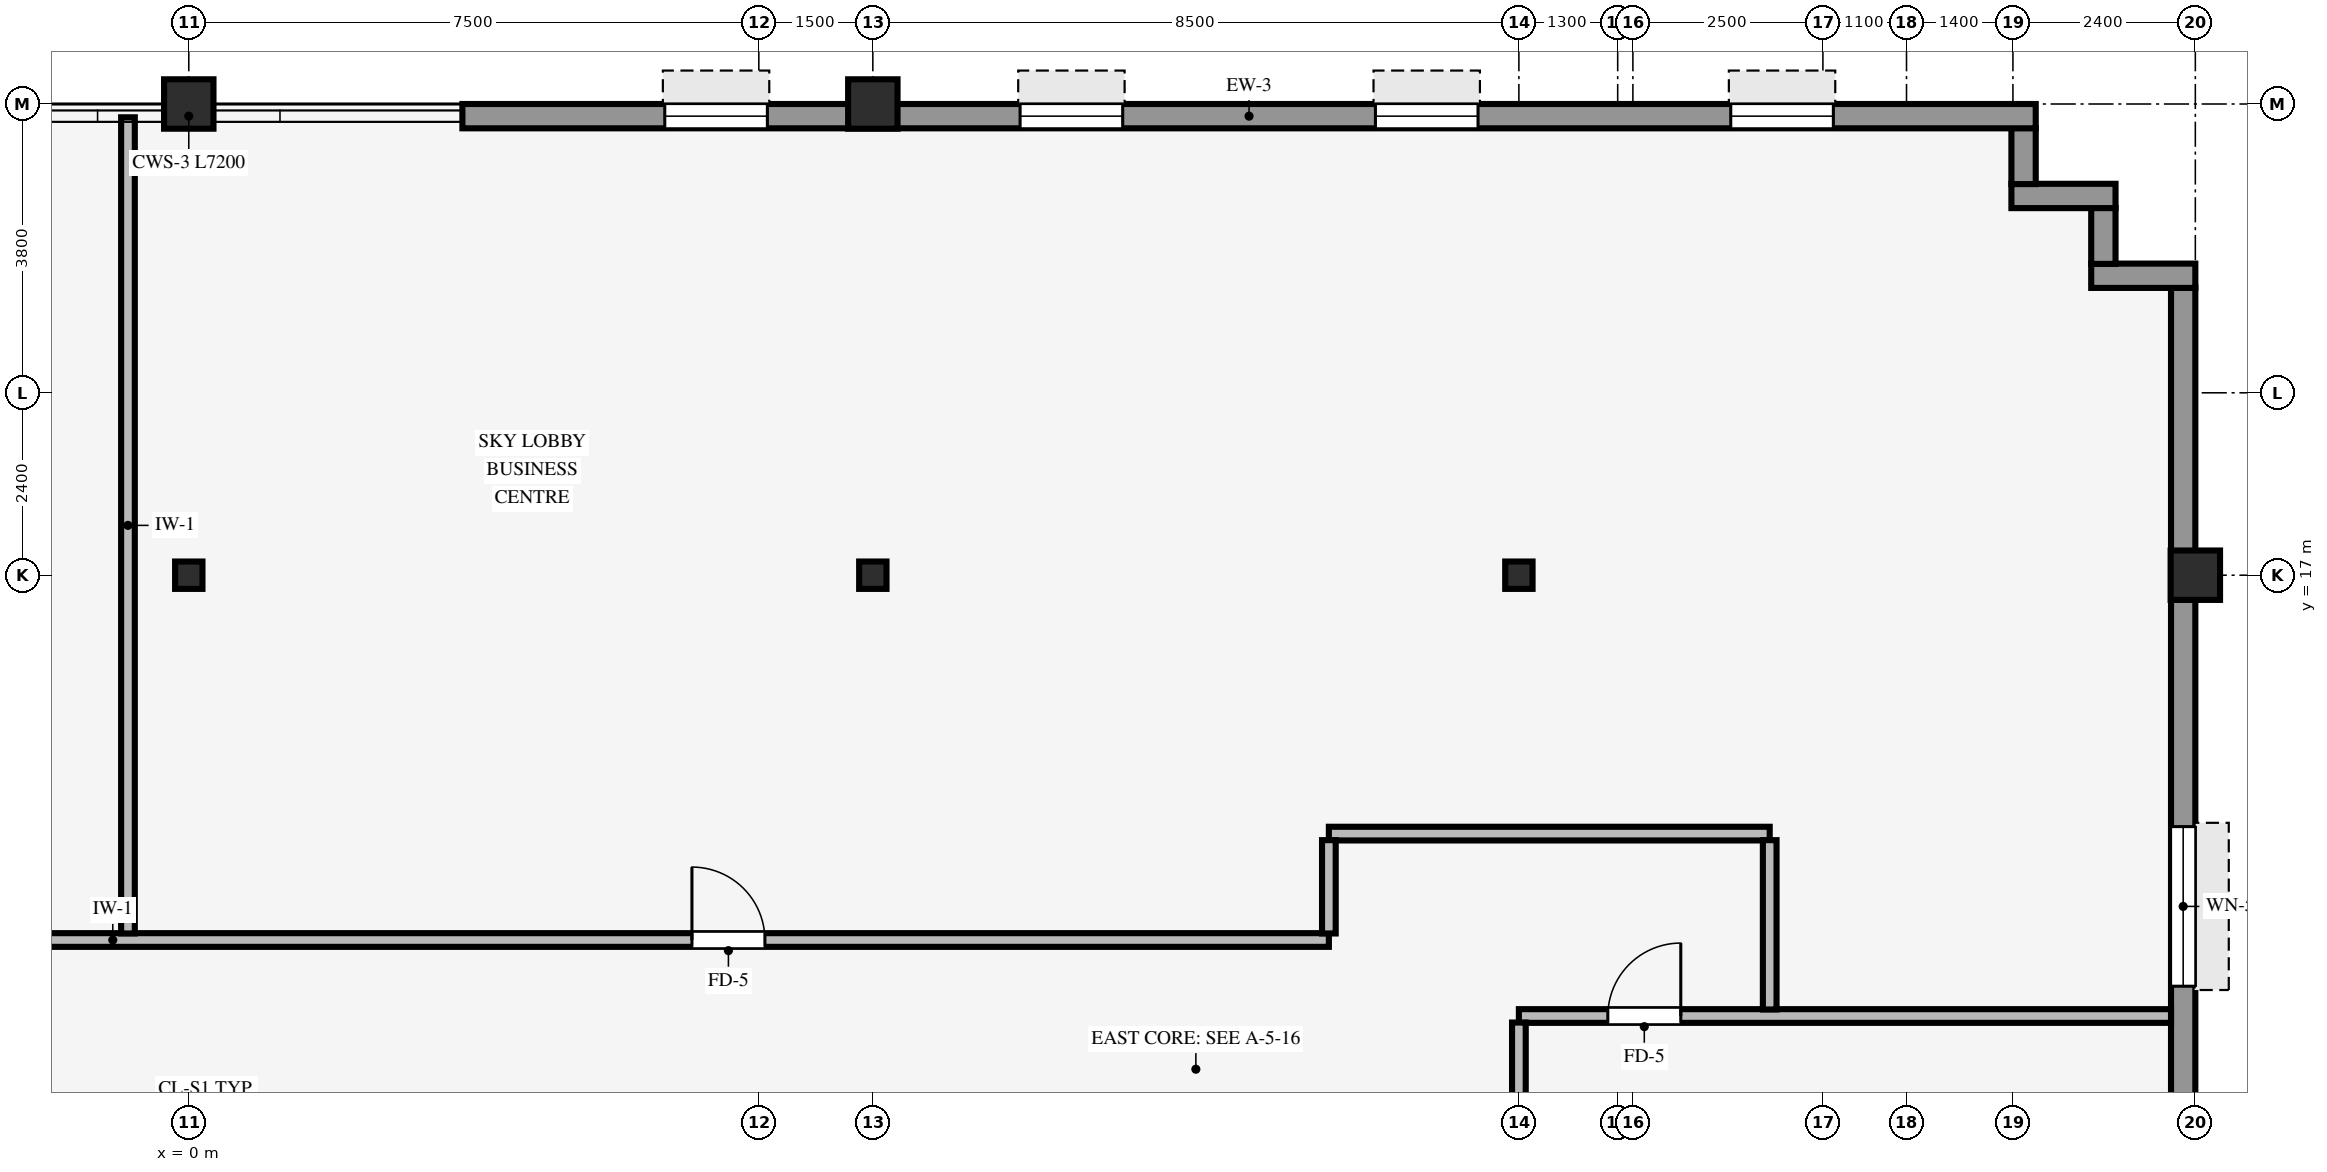
"""IFC4 building model, lengths in metres.
Left out: names, types, materials, properties, quantities, classifications, styles, units other than length and angle.
Written with IfcOpenShell. Run it as: python <this file> out.ifc"""

import sys

from ifc_helpers import new_model, si_unit, direction, frame, frame_2d, origin, origin_2d, place, context, subcontext, project, spatial, rectangle, hollow_rectangle, i_section, extrude, source, transform, mapped, element, fill, save


model = new_model("IFC4")
c1 = context("Model", 3, precision=1e-05, world=origin(), true_north=direction((0.0, 1.0)))
c2 = subcontext(c1, "Body", "Model", "MODEL_VIEW")
j1 = project(units=[si_unit("LENGTHUNIT", "METRE"), si_unit("PLANEANGLEUNIT", "RADIAN")], contexts=[c1])
p1 = place(None, origin())
s1 = spatial("IfcSite", under=j1, at=p1, CompositionType="ELEMENT")
p2 = place(p1, origin())
s2 = spatial("IfcBuilding", under=s1, at=p2, CompositionType="ELEMENT")
p3 = place(p2, frame((0.0, 0.0, 120.2)))
s3 = spatial("IfcBuildingStorey", under=s2, at=p3, CompositionType="ELEMENT", Elevation=120.2)
for number, where, z_axis, x_axis in (
    (1, (26.4, 17.0, 0.0), (0.0, 0.0, 1.0), (1.0, 0.0, 0.0)),
    (2, (0.0, 23.2, 0.0), (0.0, 0.0, 1.0), (1.0, 0.0, 0.0)),
    (3, (9.0, 23.2, 0.0), (0.0, 0.0, 1.0), (1.0, 0.0, 0.0)),
):
    element("IfcColumn", number, at=place(p3, frame(where, z_axis=z_axis, x_axis=x_axis)), inside=s3, PredefinedType="COLUMN", context=c2, shape_type="SweptSolid", body=[
        extrude(hollow_rectangle(XDim=0.65, YDim=0.65, WallThickness=0.04, InnerFilletRadius=0.04, OuterFilletRadius=0.08, at=origin_2d()), origin(), (0.0, 0.0, 1.0), 3.37),
    ])
for number, where, z_axis, x_axis in (
    (4, (0.0, 17.0, 0.0), (0.0, 0.0, 1.0), (1.0, 0.0, 0.0)),
    (5, (9.0, 17.0, 0.0), (0.0, 0.0, 1.0), (1.0, 0.0, 0.0)),
    (6, (17.5, 17.0, 0.0), (0.0, 0.0, 1.0), (1.0, 0.0, 0.0)),
):
    element("IfcColumn", number, at=place(p3, frame(where, z_axis=z_axis, x_axis=x_axis)), inside=s3, PredefinedType="COLUMN", context=c2, shape_type="SweptSolid", body=[
        extrude(i_section(OverallWidth=0.36, OverallDepth=0.36, WebThickness=0.021, FlangeThickness=0.021, FilletRadius=0.018, at=origin_2d()), origin(), (0.0, 0.0, 1.0), 3.37),
    ])
p4 = place(p3, frame((26.24, 3.6, 0.0), z_axis=(0.0, 0.0, 1.0), x_axis=(0.0, 1.0, 0.0)))
e7 = element("IfcWall", 7, at=p4, inside=s3, PredefinedType="STANDARD", context=c2, shape_type="SweptSolid", body=[
    extrude(rectangle(XDim=17.184, YDim=0.32, at=frame_2d((8.592, 0.0))), origin(), (0.0, 0.0, 1.0), 2.705),
])
p5 = place(p4, frame((2.481, 0.0, 0.8)))
e8 = element("IfcOpeningElement", 8, at=p5, cuts=e7, PredefinedType="OPENING", context=c2, shape_type="SweptSolid", body=[
    extrude(rectangle(XDim=2.1, YDim=1.56, at=frame_2d((1.05, 0.78))), frame((0.0, 0.17, 0.0), z_axis=(0.0, -1.0, 0.0), x_axis=(1.0, 0.0, 0.0)), (0.0, 0.0, 1.0), 0.34),
])
p6 = place(p4, frame((7.992, 0.0, 0.8)))
e9 = element("IfcOpeningElement", 9, at=p6, cuts=e7, PredefinedType="OPENING", context=c2, shape_type="SweptSolid", body=[
    extrude(rectangle(XDim=2.1, YDim=1.56, at=frame_2d((1.05, 0.78))), frame((0.0, 0.17, 0.0), z_axis=(0.0, -1.0, 0.0), x_axis=(1.0, 0.0, 0.0)), (0.0, 0.0, 1.0), 0.34),
])
p7 = place(p3, frame((25.03, 20.94, 0.0), z_axis=(0.0, 0.0, 1.0), x_axis=(1.0, 0.0, 0.0)))
e10 = element("IfcWall", 10, at=p7, inside=s3, PredefinedType="STANDARD", context=c2, shape_type="SweptSolid", body=[
    extrude(rectangle(XDim=1.37, YDim=0.32, at=frame_2d((0.685, 0.0))), origin(), (0.0, 0.0, 1.0), 3.36),
])
p8 = place(p3, frame((25.19, 21.096, 0.0), z_axis=(0.0, 0.0, 1.0), x_axis=(0.0, 1.0, 0.0)))
e11 = element("IfcWall", 11, at=p8, inside=s3, PredefinedType="STANDARD", context=c2, shape_type="SweptSolid", body=[
    extrude(rectangle(XDim=0.738, YDim=0.32, at=frame_2d((0.369, 0.0))), origin(), (0.0, 0.0, 1.0), 3.36),
])
p9 = place(p3, frame((23.98, 21.99, 0.0), z_axis=(0.0, 0.0, 1.0), x_axis=(1.0, 0.0, 0.0)))
e12 = element("IfcWall", 12, at=p9, inside=s3, PredefinedType="STANDARD", context=c2, shape_type="SweptSolid", body=[
    extrude(rectangle(XDim=1.37, YDim=0.32, at=frame_2d((0.685, 0.0))), origin(), (0.0, 0.0, 1.0), 3.36),
])
p10 = place(p3, frame((24.14, 22.146, 0.0), z_axis=(0.0, 0.0, 1.0), x_axis=(0.0, 1.0, 0.0)))
e13 = element("IfcWall", 13, at=p10, inside=s3, PredefinedType="STANDARD", context=c2, shape_type="SweptSolid", body=[
    extrude(rectangle(XDim=0.738, YDim=0.32, at=frame_2d((0.369, 0.0))), origin(), (0.0, 0.0, 1.0), 3.36),
])
p11 = place(p3, frame((3.6, 23.04, 0.0), z_axis=(0.0, 0.0, 1.0), x_axis=(1.0, 0.0, 0.0)))
e14 = element("IfcWall", 14, at=p11, inside=s3, PredefinedType="STANDARD", context=c2, shape_type="SweptSolid", body=[
    extrude(rectangle(XDim=20.7, YDim=0.32, at=frame_2d((10.35, 0.0))), origin(), (0.0, 0.0, 1.0), 2.705),
])
p12 = place(p11, frame((2.663, 0.0, 0.8)))
e15 = element("IfcOpeningElement", 15, at=p12, cuts=e14, PredefinedType="OPENING", context=c2, shape_type="SweptSolid", body=[
    extrude(rectangle(XDim=1.35, YDim=1.56, at=frame_2d((0.675, 0.78))), frame((0.0, 0.17, 0.0), z_axis=(0.0, -1.0, 0.0), x_axis=(1.0, 0.0, 0.0)), (0.0, 0.0, 1.0), 0.34),
])
p13 = place(p11, frame((7.337, 0.0, 0.8)))
e16 = element("IfcOpeningElement", 16, at=p13, cuts=e14, PredefinedType="OPENING", context=c2, shape_type="SweptSolid", body=[
    extrude(rectangle(XDim=1.35, YDim=1.56, at=frame_2d((0.675, 0.78))), frame((0.0, 0.17, 0.0), z_axis=(0.0, -1.0, 0.0), x_axis=(1.0, 0.0, 0.0)), (0.0, 0.0, 1.0), 0.34),
])
p14 = place(p11, frame((12.012, 0.0, 0.8)))
e17 = element("IfcOpeningElement", 17, at=p14, cuts=e14, PredefinedType="OPENING", context=c2, shape_type="SweptSolid", body=[
    extrude(rectangle(XDim=1.35, YDim=1.56, at=frame_2d((0.675, 0.78))), frame((0.0, 0.17, 0.0), z_axis=(0.0, -1.0, 0.0), x_axis=(1.0, 0.0, 0.0)), (0.0, 0.0, 1.0), 0.34),
])
p15 = place(p11, frame((16.688, 0.0, 0.8)))
e18 = element("IfcOpeningElement", 18, at=p15, cuts=e14, PredefinedType="OPENING", context=c2, shape_type="SweptSolid", body=[
    extrude(rectangle(XDim=1.35, YDim=1.56, at=frame_2d((0.675, 0.78))), frame((0.0, 0.17, 0.0), z_axis=(0.0, -1.0, 0.0), x_axis=(1.0, 0.0, 0.0)), (0.0, 0.0, 1.0), 0.34),
])
p16 = place(p3, frame((17.5, 11.2, 0.0), z_axis=(0.0, 0.0, 1.0), x_axis=(1.0, 0.0, 0.0)))
e19 = element("IfcWall", 19, at=p16, inside=s3, PredefinedType="PARTITIONING", context=c2, shape_type="SweptSolid", body=[
    extrude(rectangle(XDim=8.58, YDim=0.18, at=frame_2d((4.29, 0.0))), origin(), (0.0, 0.0, 1.0), 3.36),
])
p17 = place(p16, frame((1.17, 0.0, 0.0)))
e20 = element("IfcOpeningElement", 20, at=p17, cuts=e19, PredefinedType="OPENING", context=c2, shape_type="SweptSolid", body=[
    extrude(rectangle(XDim=0.96, YDim=2.1, at=frame_2d((0.48, 1.05))), frame((0.0, 0.1, 0.0), z_axis=(0.0, -1.0, 0.0), x_axis=(1.0, 0.0, 0.0)), (0.0, 0.0, 1.0), 0.2),
])
p18 = place(p3, frame((-15.0, 12.2, 0.0), z_axis=(0.0, 0.0, 1.0), x_axis=(1.0, 0.0, 0.0)))
e21 = element("IfcWall", 21, at=p18, inside=s3, PredefinedType="PARTITIONING", context=c2, shape_type="SweptSolid", body=[
    extrude(rectangle(XDim=30.0, YDim=0.18, at=frame_2d((15.0, 0.0))), origin(), (0.0, 0.0, 1.0), 3.36),
])
p19 = place(p18, frame((21.62, 0.0, 0.0)))
e22 = element("IfcOpeningElement", 22, at=p19, cuts=e21, PredefinedType="OPENING", context=c2, shape_type="SweptSolid", body=[
    extrude(rectangle(XDim=0.96, YDim=2.1, at=frame_2d((0.48, 1.05))), frame((0.0, 0.1, 0.0), z_axis=(0.0, -1.0, 0.0), x_axis=(1.0, 0.0, 0.0)), (0.0, 0.0, 1.0), 0.2),
])
p20 = place(p18, frame((5.42, 0.0, 0.0)))
e23 = element("IfcOpeningElement", 23, at=p20, cuts=e21, PredefinedType="OPENING", context=c2, shape_type="SweptSolid", body=[
    extrude(rectangle(XDim=0.96, YDim=2.1, at=frame_2d((0.48, 1.05))), frame((0.0, 0.1, 0.0), z_axis=(0.0, -1.0, 0.0), x_axis=(1.0, 0.0, 0.0)), (0.0, 0.0, 1.0), 0.2),
])
p21 = place(p3, frame((15.0, 13.6, 0.0), z_axis=(0.0, 0.0, 1.0), x_axis=(1.0, 0.0, 0.0)))
e24 = element("IfcWall", 24, at=p21, inside=s3, PredefinedType="PARTITIONING", context=c2, shape_type="SweptSolid", body=[
    extrude(rectangle(XDim=5.8, YDim=0.18, at=frame_2d((2.9, 0.0))), origin(), (0.0, 0.0, 1.0), 2.998),
])
p22 = place(p3, frame((-0.8, 12.286, 0.0), z_axis=(0.0, 0.0, 1.0), x_axis=(0.0, 1.0, 0.0)))
e25 = element("IfcWall", 25, at=p22, inside=s3, PredefinedType="PARTITIONING", context=c2, shape_type="SweptSolid", body=[
    extrude(rectangle(XDim=10.739, YDim=0.18, at=frame_2d((5.37, 0.0))), origin(), (0.0, 0.0, 1.0), 3.36),
])
p23 = place(p3, frame((15.0, 12.286, 0.0), z_axis=(0.0, 0.0, 1.0), x_axis=(0.0, 1.0, 0.0)))
e26 = element("IfcWall", 26, at=p23, inside=s3, PredefinedType="PARTITIONING", context=c2, shape_type="SweptSolid", body=[
    extrude(rectangle(XDim=1.228, YDim=0.18, at=frame_2d((0.614, 0.0))), origin(), (0.0, 0.0, 1.0), 3.36),
])
p24 = place(p3, frame((17.5, 10.146, 0.0), z_axis=(0.0, 0.0, 1.0), x_axis=(0.0, 1.0, 0.0)))
e27 = element("IfcWall", 27, at=p24, inside=s3, PredefinedType="PARTITIONING", context=c2, shape_type="SweptSolid", body=[
    extrude(rectangle(XDim=0.968, YDim=0.18, at=frame_2d((0.484, 0.0))), origin(), (0.0, 0.0, 1.0), 2.816),
])
p25 = place(p3, frame((20.8, 11.286, 0.0), z_axis=(0.0, 0.0, 1.0), x_axis=(0.0, 1.0, 0.0)))
e28 = element("IfcWall", 28, at=p25, inside=s3, PredefinedType="PARTITIONING", context=c2, shape_type="SweptSolid", body=[
    extrude(rectangle(XDim=2.228, YDim=0.18, at=frame_2d((1.114, 0.0))), origin(), (0.0, 0.0, 1.0), 3.36),
])
m1 = source(origin(), c2, "Body", "SweptSolid", [
    extrude(rectangle(XDim=2.1, YDim=1.56, at=frame_2d((1.05, 0.78))), frame((0.0, 0.03, 0.0), z_axis=(0.0, -1.0, 0.0), x_axis=(1.0, 0.0, 0.0)), (0.0, 0.0, 1.0), 0.06),
])
p26 = place(p6, origin())
e29 = element("IfcWindow", 29, at=p26, inside=s3, PartitioningType="SINGLE_PANEL", PredefinedType="WINDOW", context=c2, shape_type="MappedRepresentation", body=[
    mapped(m1, transform((0.0, 0.0, 0.0), scale=1.0)),
])
fill(e9, e29)
m2 = source(origin(), c2, "Body", "SweptSolid", [
    extrude(rectangle(XDim=1.35, YDim=1.56, at=frame_2d((0.675, 0.78))), frame((0.0, 0.03, 0.0), z_axis=(0.0, -1.0, 0.0), x_axis=(1.0, 0.0, 0.0)), (0.0, 0.0, 1.0), 0.06),
])
p27 = place(p12, origin())
e30 = element("IfcWindow", 30, at=p27, inside=s3, PartitioningType="SINGLE_PANEL", PredefinedType="WINDOW", context=c2, shape_type="MappedRepresentation", body=[
    mapped(m2, transform((0.0, 0.0, 0.0), scale=1.0)),
])
fill(e15, e30)
p28 = place(p13, origin())
e31 = element("IfcWindow", 31, at=p28, inside=s3, PartitioningType="SINGLE_PANEL", PredefinedType="WINDOW", context=c2, shape_type="MappedRepresentation", body=[
    mapped(m2, transform((0.0, 0.0, 0.0), scale=1.0)),
])
fill(e16, e31)
p29 = place(p14, origin())
e32 = element("IfcWindow", 32, at=p29, inside=s3, PartitioningType="SINGLE_PANEL", PredefinedType="WINDOW", context=c2, shape_type="MappedRepresentation", body=[
    mapped(m2, transform((0.0, 0.0, 0.0), scale=1.0)),
])
fill(e17, e32)
p30 = place(p15, origin())
e33 = element("IfcWindow", 33, at=p30, inside=s3, PartitioningType="SINGLE_PANEL", PredefinedType="WINDOW", context=c2, shape_type="MappedRepresentation", body=[
    mapped(m2, transform((0.0, 0.0, 0.0), scale=1.0)),
])
fill(e18, e33)
m3 = source(origin(), c2, "Body", "SweptSolid", [
    extrude(rectangle(XDim=0.96, YDim=2.1, at=frame_2d((0.48, 1.05))), frame((0.0, 0.025, 0.0), z_axis=(0.0, -1.0, 0.0), x_axis=(1.0, 0.0, 0.0)), (0.0, 0.0, 1.0), 0.05),
])
p31 = place(p19, origin())
e34 = element("IfcDoor", 34, at=p31, inside=s3, OperationType="SINGLE_SWING_LEFT", PredefinedType="DOOR", context=c2, shape_type="MappedRepresentation", body=[
    mapped(m3, transform((0.0, 0.0, 0.0), scale=1.0)),
])
fill(e22, e34)
p32 = place(p17, origin())
e35 = element("IfcDoor", 35, at=p32, inside=s3, OperationType="SINGLE_SWING_RIGHT", PredefinedType="DOOR", context=c2, shape_type="MappedRepresentation", body=[
    mapped(m3, transform((0.0, 0.0, 0.0), scale=1.0)),
])
fill(e20, e35)
save(model, sys.argv[1])
